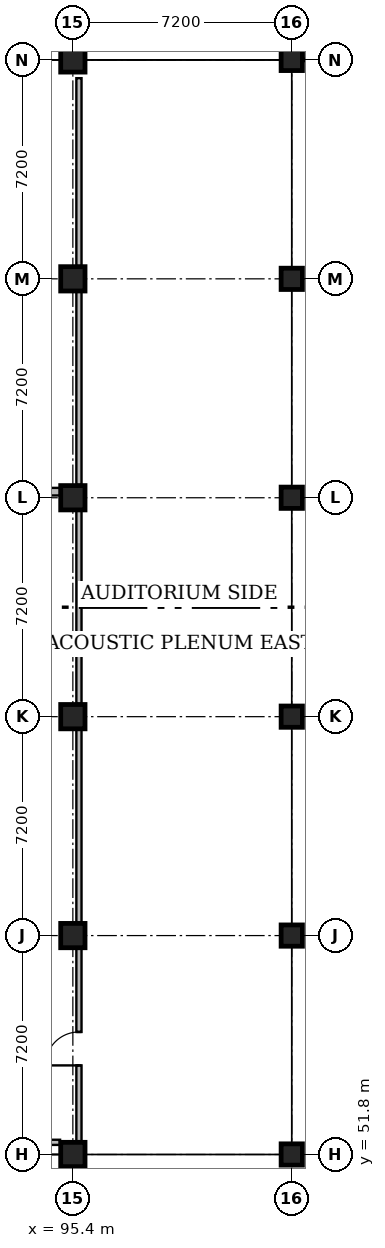
"""IFC4 building model, lengths in metres.
Left out: names, types, materials, properties, quantities, classifications, styles, units other than length and angle.
Written with IfcOpenShell. Run it as: python <this file> out.ifc"""

import sys

from ifc_helpers import new_model, si_unit, direction, frame, frame_2d, origin, origin_2d, place, context, subcontext, project, spatial, rectangle, extrude, element, fill, save


model = new_model("IFC4")
c1 = context("Model", 3, precision=1e-05, world=origin(), true_north=direction((0.0, 1.0)))
c2 = subcontext(c1, "Body", "Model", "MODEL_VIEW")
j1 = project(units=[si_unit("LENGTHUNIT", "METRE"), si_unit("PLANEANGLEUNIT", "RADIAN")], contexts=[c1])
p1 = place(None, origin())
s1 = spatial("IfcSite", under=j1, at=p1, CompositionType="ELEMENT")
p2 = place(p1, origin())
s2 = spatial("IfcBuilding", under=s1, at=p2, CompositionType="ELEMENT")
p3 = place(p2, frame((0.0, 0.0, -4.8)))
s3 = spatial("IfcBuildingStorey", under=s2, at=p3, CompositionType="ELEMENT", Elevation=-4.8)
for number, where, z_axis, x_axis in (
    (1, (95.4, 51.8, 0.0), (0.0, 0.0, 1.0), (1.0, 0.0, 0.0)),
    (2, (95.4, 59.0, 0.0), (0.0, 0.0, 1.0), (1.0, 0.0, 0.0)),
    (3, (95.4, 66.2, 0.0), (0.0, 0.0, 1.0), (1.0, 0.0, 0.0)),
    (4, (95.4, 73.4, 0.0), (0.0, 0.0, 1.0), (1.0, 0.0, 0.0)),
    (5, (95.4, 80.6, 0.0), (0.0, 0.0, 1.0), (1.0, 0.0, 0.0)),
    (6, (95.4, 87.8, 0.0), (0.0, 0.0, 1.0), (1.0, 0.0, 0.0)),
):
    element("IfcColumn", number, at=place(p3, frame(where, z_axis=z_axis, x_axis=x_axis)), inside=s3, PredefinedType="COLUMN", context=c2, shape_type="SweptSolid", body=[
        extrude(rectangle(XDim=0.8, YDim=0.8, at=origin_2d()), origin(), (0.0, 0.0, 1.0), 4.8),
    ])
for number, where, z_axis, x_axis in (
    (7, (102.6, 51.8, 0.0), (0.0, 0.0, 1.0), (1.0, 0.0, 0.0)),
    (8, (102.6, 59.0, 0.0), (0.0, 0.0, 1.0), (1.0, 0.0, 0.0)),
    (9, (102.6, 66.2, 0.0), (0.0, 0.0, 1.0), (1.0, 0.0, 0.0)),
    (10, (102.6, 73.4, 0.0), (0.0, 0.0, 1.0), (1.0, 0.0, 0.0)),
    (11, (102.6, 80.6, 0.0), (0.0, 0.0, 1.0), (1.0, 0.0, 0.0)),
    (12, (102.6, 87.8, 0.0), (0.0, 0.0, 1.0), (1.0, 0.0, 0.0)),
):
    element("IfcColumn", number, at=place(p3, frame(where, z_axis=z_axis, x_axis=x_axis)), inside=s3, PredefinedType="COLUMN", context=c2, shape_type="SweptSolid", body=[
        extrude(rectangle(XDim=0.7, YDim=0.7, at=origin_2d()), origin(), (0.0, 0.0, 1.0), 4.8),
    ])
p4 = place(p3, frame((102.6, 88.0, 0.0), z_axis=(0.0, 0.0, 1.0), x_axis=(1.0, 0.0, 0.0)))
e13 = element("IfcWall", 13, at=p4, inside=s3, PredefinedType="SOLIDWALL", context=c2, shape_type="SweptSolid", body=[
    extrude(rectangle(XDim=48.0, YDim=0.4, at=frame_2d((24.0, 0.0))), origin(), (0.0, 0.0, 1.0), 4.48),
])
p5 = place(p3, frame((94.98, 73.6, 0.0), z_axis=(0.0, 0.0, 1.0), x_axis=(-1.0, 0.0, 0.0)))
e14 = element("IfcWall", 14, at=p5, inside=s3, PredefinedType="PARTITIONING", context=c2, shape_type="SweptSolid", body=[
    extrude(rectangle(XDim=36.96, YDim=0.25, at=frame_2d((18.48, 0.0))), origin(), (0.0, 0.0, 1.0), 4.52),
])
p6 = place(p5, frame((20.24, 0.0, 0.0)))
e15 = element("IfcOpeningElement", 15, at=p6, cuts=e14, PredefinedType="OPENING", context=c2, shape_type="SweptSolid", body=[
    extrude(rectangle(XDim=1.95, YDim=2.4, at=frame_2d((0.975, 1.2))), frame((0.0, 0.145, 0.0), z_axis=(0.0, -1.0, 0.0), x_axis=(1.0, 0.0, 0.0)), (0.0, 0.0, 1.0), 0.29),
])
p7 = place(p3, frame((94.98, 52.2, 0.0), z_axis=(0.0, 0.0, 1.0), x_axis=(-1.0, 0.0, 0.0)))
e16 = element("IfcWall", 16, at=p7, inside=s3, PredefinedType="PARTITIONING", context=c2, shape_type="SweptSolid", body=[
    extrude(rectangle(XDim=4.56, YDim=0.17, at=frame_2d((2.28, 0.0))), origin(), (0.0, 0.0, 1.0), 3.84),
])
p8 = place(p7, frame((1.582, 0.0, 0.0)))
e17 = element("IfcOpeningElement", 17, at=p8, cuts=e16, PredefinedType="OPENING", context=c2, shape_type="SweptSolid", body=[
    extrude(rectangle(XDim=1.15, YDim=2.15, at=frame_2d((0.575, 1.075))), frame((0.0, 0.105, 0.0), z_axis=(0.0, -1.0, 0.0), x_axis=(1.0, 0.0, 0.0)), (0.0, 0.0, 1.0), 0.21),
])
p9 = place(p3, frame((95.6, 52.22, 0.0), z_axis=(0.0, 0.0, 1.0), x_axis=(0.0, 1.0, 0.0)))
e18 = element("IfcWall", 18, at=p9, inside=s3, PredefinedType="PARTITIONING", context=c2, shape_type="SweptSolid", body=[
    extrude(rectangle(XDim=6.36, YDim=0.17, at=frame_2d((3.18, 0.0))), origin(), (0.0, 0.0, 1.0), 3.84),
])
p10 = place(p9, frame((2.51, 0.0, 0.0)))
e19 = element("IfcOpeningElement", 19, at=p10, cuts=e18, PredefinedType="OPENING", context=c2, shape_type="SweptSolid", body=[
    extrude(rectangle(XDim=1.1, YDim=2.1, at=frame_2d((0.55, 1.05))), frame((0.0, 0.105, 0.0), z_axis=(0.0, -1.0, 0.0), x_axis=(1.0, 0.0, 0.0)), (0.0, 0.0, 1.0), 0.21),
])
p11 = place(p3, frame((95.6, 59.42, 0.0), z_axis=(0.0, 0.0, 1.0), x_axis=(0.0, 1.0, 0.0)))
e20 = element("IfcWall", 20, at=p11, inside=s3, PredefinedType="PARTITIONING", context=c2, shape_type="SweptSolid", body=[
    extrude(rectangle(XDim=6.36, YDim=0.17, at=frame_2d((3.18, 0.0))), origin(), (0.0, 0.0, 1.0), 3.84),
])
for number, where, z_axis, x_axis in (
    (21, (95.6, 66.62, 0.0), (0.0, 0.0, 1.0), (0.0, 1.0, 0.0)),
    (22, (95.6, 73.82, 0.0), (0.0, 0.0, 1.0), (0.0, 1.0, 0.0)),
):
    element("IfcWall", number, at=place(p3, frame(where, z_axis=z_axis, x_axis=x_axis)), inside=s3, PredefinedType="PARTITIONING", context=c2, shape_type="SweptSolid", body=[
        extrude(rectangle(XDim=6.36, YDim=0.17, at=frame_2d((3.18, 0.0))), origin(), (0.0, 0.0, 1.0), 3.84),
    ])
p12 = place(p3, frame((95.6, 81.02, 0.0), z_axis=(0.0, 0.0, 1.0), x_axis=(0.0, 1.0, 0.0)))
e23 = element("IfcWall", 23, at=p12, inside=s3, PredefinedType="PARTITIONING", context=c2, shape_type="SweptSolid", body=[
    extrude(rectangle(XDim=6.18, YDim=0.17, at=frame_2d((3.09, 0.0))), origin(), (0.0, 0.0, 1.0), 3.8),
])
p13 = place(p10, origin())
e24 = element("IfcDoor", 24, at=p13, inside=s3, OperationType="SINGLE_SWING_LEFT", PredefinedType="DOOR", context=c2, shape_type="SweptSolid", body=[
    extrude(rectangle(XDim=1.1, YDim=2.1, at=frame_2d((0.55, 1.05))), frame((0.0, 0.025, 0.0), z_axis=(0.0, -1.0, 0.0), x_axis=(1.0, 0.0, 0.0)), (0.0, 0.0, 1.0), 0.05),
])
fill(e19, e24)
save(model, sys.argv[1])
